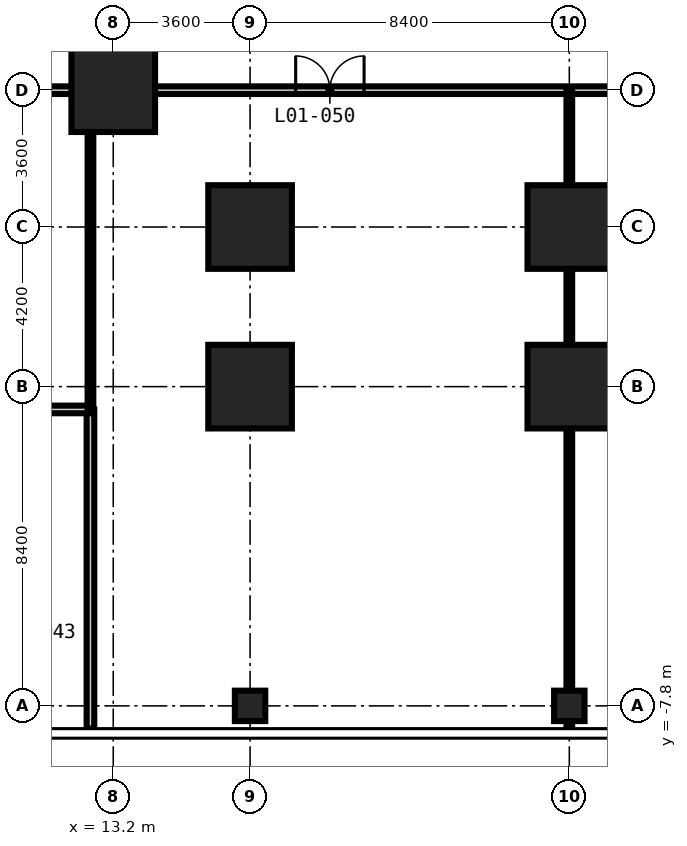
"""IFC4 building model, lengths in metres.
Left out: names, types, materials, properties, quantities, classifications, styles, units other than length and angle.
Written with IfcOpenShell. Run it as: python <this file> out.ifc"""

import sys

from ifc_helpers import new_model, si_unit, direction, frame, frame_2d, origin, origin_with_axes, origin_2d, place, context, subcontext, project, spatial, rectangle, extrude, element, fill, save


model = new_model("IFC4")
c1 = context("Model", 3, precision=1e-05, world=origin(), true_north=direction((0.0, 1.0)))
c2 = subcontext(c1, "Body", "Model", "MODEL_VIEW")
j1 = project(units=[si_unit("LENGTHUNIT", "METRE"), si_unit("PLANEANGLEUNIT", "RADIAN")], contexts=[c1])
p1 = place(None, origin())
s1 = spatial("IfcSite", under=j1, at=p1, CompositionType="ELEMENT")
p2 = place(p1, origin())
s2 = spatial("IfcBuilding", under=s1, at=p2, CompositionType="ELEMENT")
p3 = place(p2, frame((0.0, 0.0, 6.0)))
s3 = spatial("IfcBuildingStorey", under=s2, at=p3, CompositionType="ELEMENT", Elevation=6.0)
for number, where, z_axis, x_axis in (
    (1, (13.2, 8.4, -0.3), (0.0, 0.0, 1.0), (1.0, 0.0, 0.0)),
    (2, (16.8, 0.6, -0.3), (0.0, 0.0, 1.0), (1.0, 0.0, 0.0)),
    (3, (16.8, 4.8, -0.3), (0.0, 0.0, 1.0), (1.0, 0.0, 0.0)),
    (4, (25.2, 0.6, -0.3), (0.0, 0.0, 1.0), (1.0, 0.0, 0.0)),
    (5, (25.2, 4.8, -0.3), (0.0, 0.0, 1.0), (1.0, 0.0, 0.0)),
):
    element("IfcColumn", number, at=place(p3, frame(where, z_axis=z_axis, x_axis=x_axis)), inside=s3, PredefinedType="COLUMN", context=c2, shape_type="SweptSolid", body=[
        extrude(rectangle(XDim=2.2, YDim=2.2, at=origin_2d()), origin(), (0.0, 0.0, 1.0), 6.0),
    ])
for number, where, z_axis, x_axis in (
    (6, (16.8, -7.8, -0.3), (0.0, 0.0, 1.0), (1.0, 0.0, 0.0)),
    (7, (25.2, -7.8, -0.3), (0.0, 0.0, 1.0), (1.0, 0.0, 0.0)),
):
    element("IfcColumn", number, at=place(p3, frame(where, z_axis=z_axis, x_axis=x_axis)), inside=s3, PredefinedType="COLUMN", context=c2, shape_type="SweptSolid", body=[
        extrude(rectangle(XDim=0.8, YDim=0.8, at=origin_2d()), origin(), (0.0, 0.0, 1.0), 6.0),
    ])
p4 = place(p3, frame((12.6, -8.4, 0.0), z_axis=(0.0, 0.0, 1.0), x_axis=(0.0, 1.0, 0.0)))
e8 = element("IfcWall", 8, at=p4, inside=s3, PredefinedType="PARTITIONING", context=c2, shape_type="SweptSolid", body=[
    extrude(rectangle(XDim=8.4, YDim=0.2, at=frame_2d((4.2, 0.0))), origin(), (0.0, 0.0, 1.0), 5.7),
])
p5 = place(p3, origin_with_axes())
e9 = element("IfcWall", 9, at=p5, inside=s3, PredefinedType="PARTITIONING", context=c2, shape_type="SweptSolid", body=[
    extrude(rectangle(XDim=12.6, YDim=0.2, at=frame_2d((6.3, 0.0))), origin(), (0.0, 0.0, 1.0), 5.7),
])
p6 = place(p3, frame((0.0, 8.4, 0.0), z_axis=(0.0, 0.0, 1.0), x_axis=(1.0, 0.0, 0.0)))
e10 = element("IfcWall", 10, at=p6, inside=s3, PredefinedType="PARTITIONING", context=c2, shape_type="SweptSolid", body=[
    extrude(rectangle(XDim=42.0, YDim=0.2, at=frame_2d((21.0, 0.0))), origin(), (0.0, 0.0, 1.0), 5.7),
])
p7 = place(p6, frame((6.0, 0.0, 0.0)))
e11 = element("IfcOpeningElement", 11, at=p7, cuts=e10, PredefinedType="OPENING", context=c2, shape_type="SweptSolid", body=[
    extrude(rectangle(XDim=1.0, YDim=2.1, at=frame_2d((0.5, 1.05))), frame((0.0, 0.11, 0.0), z_axis=(0.0, -1.0, 0.0), x_axis=(1.0, 0.0, 0.0)), (0.0, 0.0, 1.0), 0.22),
])
p8 = place(p6, frame((18.0, 0.0, 0.0)))
e12 = element("IfcOpeningElement", 12, at=p8, cuts=e10, PredefinedType="OPENING", context=c2, shape_type="SweptSolid", body=[
    extrude(rectangle(XDim=1.8, YDim=2.4, at=frame_2d((0.9, 1.2))), frame((0.0, 0.11, 0.0), z_axis=(0.0, -1.0, 0.0), x_axis=(1.0, 0.0, 0.0)), (0.0, 0.0, 1.0), 0.22),
])
p9 = place(p6, frame((28.9, 0.0, 0.0)))
e13 = element("IfcOpeningElement", 13, at=p9, cuts=e10, PredefinedType="OPENING", context=c2, shape_type="SweptSolid", body=[
    extrude(rectangle(XDim=1.0, YDim=2.1, at=frame_2d((0.5, 1.05))), frame((0.0, 0.11, 0.0), z_axis=(0.0, -1.0, 0.0), x_axis=(1.0, 0.0, 0.0)), (0.0, 0.0, 1.0), 0.22),
])
p10 = place(p3, frame((12.6, 0.0, 0.0), z_axis=(0.0, 0.0, 1.0), x_axis=(0.0, 1.0, 0.0)))
e14 = element("IfcWall", 14, at=p10, inside=s3, PredefinedType="PARTITIONING", context=c2, shape_type="SweptSolid", body=[
    extrude(rectangle(XDim=8.4, YDim=0.15, at=frame_2d((4.2, 0.0))), origin(), (0.0, 0.0, 1.0), 5.7),
])
p11 = place(p3, frame((25.2, -8.4, 0.0), z_axis=(0.0, 0.0, 1.0), x_axis=(0.0, 1.0, 0.0)))
e15 = element("IfcWall", 15, at=p11, inside=s3, PredefinedType="PARTITIONING", context=c2, shape_type="SweptSolid", body=[
    extrude(rectangle(XDim=16.8, YDim=0.15, at=frame_2d((8.4, 0.0))), origin(), (0.0, 0.0, 1.0), 5.7),
])
p12 = place(p8, origin())
e16 = element("IfcDoor", 16, at=p12, inside=s3, OperationType="DOUBLE_DOOR_DOUBLE_SWING", PredefinedType="DOOR", context=c2, shape_type="SweptSolid", body=[
    extrude(rectangle(XDim=1.8, YDim=2.4, at=frame_2d((0.9, 1.2))), frame((0.0, 0.025, 0.0), z_axis=(0.0, -1.0, 0.0), x_axis=(1.0, 0.0, 0.0)), (0.0, 0.0, 1.0), 0.05),
])
fill(e12, e16)
save(model, sys.argv[1])
